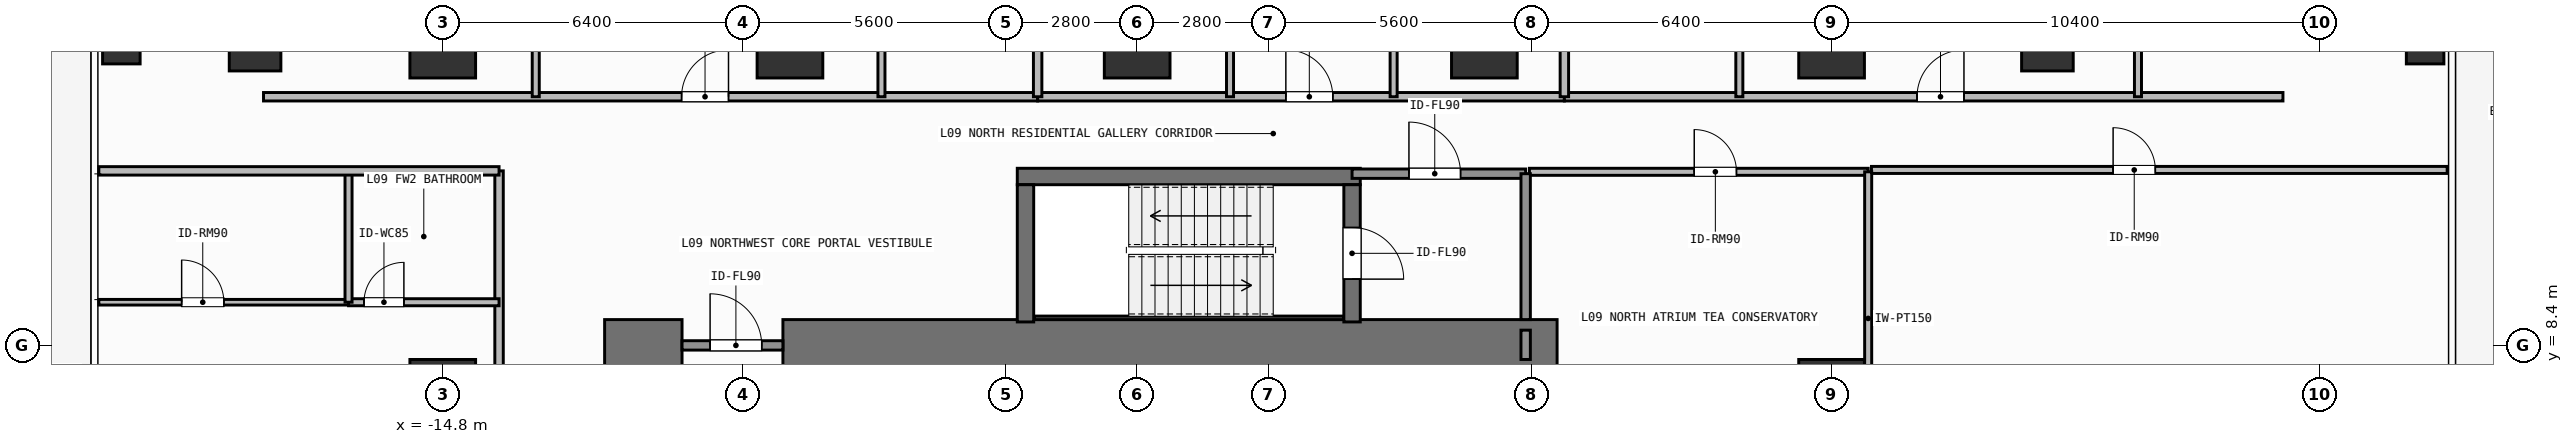
"""IFC4 building model, lengths in metres.
Left out: names, types, materials, properties, quantities, classifications, styles, units other than length and angle.
Written with IfcOpenShell. Run it as: python <this file> out.ifc"""

import sys

from ifc_helpers import new_model, si_unit, direction, frame, frame_2d, origin, origin_2d, place, context, subcontext, project, spatial, rectangle, hollow_rectangle, extrude, element, fill, save


model = new_model("IFC4")
c1 = context("Model", 3, precision=1e-05, world=origin(), true_north=direction((0.0, 1.0)))
c2 = subcontext(c1, "Body", "Model", "MODEL_VIEW")
j1 = project(units=[si_unit("LENGTHUNIT", "METRE"), si_unit("PLANEANGLEUNIT", "RADIAN")], contexts=[c1])
p1 = place(None, origin())
s1 = spatial("IfcSite", under=j1, at=p1, CompositionType="ELEMENT")
p2 = place(p1, origin())
s2 = spatial("IfcBuilding", under=s1, at=p2, CompositionType="ELEMENT")
p3 = place(p2, frame((0.0, 0.0, 34.5)))
s3 = spatial("IfcBuildingStorey", under=s2, at=p3, CompositionType="ELEMENT", Elevation=34.5)
p4 = place(p3, frame((-11.35, 8.4, 0.0), z_axis=(0.0, 0.0, 1.0), x_axis=(1.0, 0.0, 0.0)))
e1 = element("IfcWall", 1, at=p4, inside=s3, PredefinedType="SHEAR", context=c2, shape_type="SweptSolid", body=[
    extrude(rectangle(XDim=1.65, YDim=1.1, at=frame_2d((0.825, 0.0))), origin(), (0.0, 0.0, 1.0), 3.9),
])
p5 = place(p3, frame((-7.55, 8.4, 0.0), z_axis=(0.0, 0.0, 1.0), x_axis=(1.0, 0.0, 0.0)))
e2 = element("IfcWall", 2, at=p5, inside=s3, PredefinedType="SHEAR", context=c2, shape_type="SweptSolid", body=[
    extrude(rectangle(XDim=16.5, YDim=1.1, at=frame_2d((8.25, 0.0))), origin(), (0.0, 0.0, 1.0), 3.9),
])
p6 = place(p3, frame((-2.555, 12.0, 0.0), z_axis=(0.0, 0.0, 1.0), x_axis=(1.0, 0.0, 0.0)))
e3 = element("IfcWall", 3, at=p6, inside=s3, PredefinedType="SHEAR", context=c2, shape_type="SweptSolid", body=[
    extrude(rectangle(XDim=7.31, YDim=0.35, at=frame_2d((3.655, 0.0))), origin(), (0.0, 0.0, 1.0), 3.9),
])
p7 = place(p3, frame((-2.2, 8.988, 0.0), z_axis=(0.0, 0.0, 1.0), x_axis=(1.0, 0.0, 0.0)))
e4 = element("IfcWall", 4, at=p7, inside=s3, PredefinedType="SHEAR", context=c2, shape_type="SweptSolid", body=[
    extrude(rectangle(XDim=6.6, YDim=0.075, at=frame_2d((3.3, 0.0))), origin(), (0.0, 0.0, 1.0), 3.9),
])
p8 = place(p3, frame((-2.38, 8.9, 0.0), z_axis=(0.0, 0.0, 1.0), x_axis=(0.0, 1.0, 0.0)))
e5 = element("IfcWall", 5, at=p8, inside=s3, PredefinedType="SHEAR", context=c2, shape_type="SweptSolid", body=[
    extrude(rectangle(XDim=2.925, YDim=0.35, at=frame_2d((1.462, 0.0))), origin(), (0.0, 0.0, 1.0), 3.9),
])
p9 = place(p3, frame((4.58, 11.825, 0.0), z_axis=(0.0, 0.0, 1.0), x_axis=(0.0, -1.0, 0.0)))
e6 = element("IfcWall", 6, at=p9, inside=s3, PredefinedType="SHEAR", context=c2, shape_type="SweptSolid", body=[
    extrude(rectangle(XDim=2.925, YDim=0.35, at=frame_2d((1.462, 0.0))), origin(), (0.0, 0.0, 1.0), 3.9),
])
p10 = place(p9, frame((0.913, 0.0, 0.0)))
e7 = element("IfcOpeningElement", 7, at=p10, cuts=e6, PredefinedType="OPENING", context=c2, shape_type="SweptSolid", body=[
    extrude(rectangle(XDim=1.1, YDim=2.15, at=frame_2d((0.55, 1.075))), frame((0.0, 0.185, 0.0), z_axis=(0.0, -1.0, 0.0), x_axis=(1.0, 0.0, 0.0)), (0.0, 0.0, 1.0), 0.37),
])
for number, where, z_axis, x_axis in (
    (8, (-14.8, 14.8, 0.0), (0.0, 0.0, 1.0), (1.0, 0.0, 0.0)),
    (9, (-7.4, 14.8, 0.0), (0.0, 0.0, 1.0), (1.0, 0.0, 0.0)),
    (10, (0.0, 14.8, 0.0), (0.0, 0.0, 1.0), (1.0, 0.0, 0.0)),
    (11, (7.4, 14.8, 0.0), (0.0, 0.0, 1.0), (1.0, 0.0, 0.0)),
    (12, (14.8, 14.8, 0.0), (0.0, 0.0, 1.0), (1.0, 0.0, 0.0)),
    (13, (-14.8, 7.4, 0.0), (0.0, 0.0, 1.0), (1.0, 0.0, 0.0)),
    (14, (14.8, 7.4, 0.0), (0.0, 0.0, 1.0), (1.0, 0.0, 0.0)),
):
    element("IfcColumn", number, at=place(p3, frame(where, z_axis=z_axis, x_axis=x_axis)), inside=s3, PredefinedType="COLUMN", context=c2, shape_type="SweptSolid", body=[
        extrude(rectangle(XDim=1.4, YDim=1.4, at=origin_2d()), origin(), (0.0, 0.0, 1.0), 3.9),
    ])
for number, where, z_axis, x_axis in (
    (15, (-18.8, 14.8, 0.0), (0.0, 0.0, 1.0), (1.0, 0.0, 0.0)),
    (16, (19.4, 14.8, 0.0), (0.0, 0.0, 1.0), (1.0, 0.0, 0.0)),
):
    element("IfcColumn", number, at=place(p3, frame(where, z_axis=z_axis, x_axis=x_axis)), inside=s3, PredefinedType="COLUMN", context=c2, shape_type="SweptSolid", body=[
        extrude(rectangle(XDim=1.1, YDim=1.1, at=origin_2d()), origin(), (0.0, 0.0, 1.0), 3.9),
    ])
for number, where, z_axis, x_axis in (
    (17, (-21.65, 14.8, 0.0), (0.0, 0.0, 1.0), (1.0, 0.0, 0.0)),
    (18, (27.45, 14.8, 0.0), (0.0, 0.0, 1.0), (1.0, 0.0, 0.0)),
):
    element("IfcColumn", number, at=place(p3, frame(where, z_axis=z_axis, x_axis=x_axis)), inside=s3, PredefinedType="COLUMN", context=c2, shape_type="SweptSolid", body=[
        extrude(hollow_rectangle(XDim=0.8, YDim=0.8, WallThickness=0.036, at=origin_2d()), origin(), (0.0, 0.0, 1.0), 3.9),
    ])
p11 = place(p3, frame((4.58, 12.06, 0.0), z_axis=(0.0, 0.0, 1.0), x_axis=(1.0, 0.0, 0.0)))
e19 = element("IfcWall", 19, at=p11, inside=s3, PredefinedType="SOLIDWALL", context=c2, shape_type="SweptSolid", body=[
    extrude(rectangle(XDim=3.7, YDim=0.2, at=frame_2d((1.85, 0.0))), origin(), (0.0, 0.0, 1.0), 3.68),
])
p12 = place(p11, frame((1.212, 0.0, 0.0)))
e20 = element("IfcOpeningElement", 20, at=p12, cuts=e19, PredefinedType="OPENING", context=c2, shape_type="SweptSolid", body=[
    extrude(rectangle(XDim=1.1, YDim=2.15, at=frame_2d((0.55, 1.075))), frame((0.0, 0.11, 0.0), z_axis=(0.0, -1.0, 0.0), x_axis=(1.0, 0.0, 0.0)), (0.0, 0.0, 1.0), 0.22),
])
p13 = place(p3, frame((-9.7, 8.4, 0.0), z_axis=(0.0, 0.0, 1.0), x_axis=(1.0, 0.0, 0.0)))
e21 = element("IfcWall", 21, at=p13, inside=s3, PredefinedType="SOLIDWALL", context=c2, shape_type="SweptSolid", body=[
    extrude(rectangle(XDim=2.15, YDim=0.2, at=frame_2d((1.075, 0.0))), origin(), (0.0, 0.0, 1.0), 2.72),
])
p14 = place(p13, frame((0.598, 0.0, 0.0)))
e22 = element("IfcOpeningElement", 22, at=p14, cuts=e21, PredefinedType="OPENING", context=c2, shape_type="SweptSolid", body=[
    extrude(rectangle(XDim=1.1, YDim=2.15, at=frame_2d((0.55, 1.075))), frame((0.0, 0.11, 0.0), z_axis=(0.0, -1.0, 0.0), x_axis=(1.0, 0.0, 0.0)), (0.0, 0.0, 1.0), 0.22),
])
p15 = place(p3, frame((8.36, 12.1, 0.0), z_axis=(0.0, 0.0, 1.0), x_axis=(1.0, 0.0, 0.0)))
e23 = element("IfcWall", 23, at=p15, inside=s3, PredefinedType="PARTITIONING", context=c2, shape_type="SweptSolid", body=[
    extrude(rectangle(XDim=7.22, YDim=0.15, at=frame_2d((3.61, 0.0))), origin(), (0.0, 0.0, 1.0), 3.68),
])
p16 = place(p15, frame((3.513, 0.0, 0.0)))
e24 = element("IfcOpeningElement", 24, at=p16, cuts=e23, PredefinedType="OPENING", context=c2, shape_type="SweptSolid", body=[
    extrude(rectangle(XDim=0.9, YDim=2.1, at=frame_2d((0.45, 1.05))), frame((0.0, 0.085, 0.0), z_axis=(0.0, -1.0, 0.0), x_axis=(1.0, 0.0, 0.0)), (0.0, 0.0, 1.0), 0.17),
])
p17 = place(p3, frame((-18.62, 13.7, 0.0), z_axis=(0.0, 0.0, 1.0), x_axis=(1.0, 0.0, 0.0)))
e25 = element("IfcWall", 25, at=p17, inside=s3, PredefinedType="PARTITIONING", context=c2, shape_type="SweptSolid", body=[
    extrude(rectangle(XDim=16.499, YDim=0.18, at=frame_2d((8.25, 0.0))), origin(), (0.0, 0.0, 1.0), 3.68),
])
p18 = place(p17, frame((8.91, 0.0, 0.0)))
e26 = element("IfcOpeningElement", 26, at=p18, cuts=e25, PredefinedType="OPENING", context=c2, shape_type="SweptSolid", body=[
    extrude(rectangle(XDim=1.0, YDim=2.2, at=frame_2d((0.5, 1.1))), frame((0.0, 0.1, 0.0), z_axis=(0.0, -1.0, 0.0), x_axis=(1.0, 0.0, 0.0)), (0.0, 0.0, 1.0), 0.2),
])
p19 = place(p3, frame((-12.818, 13.7, 0.0), z_axis=(0.0, 0.0, 1.0), x_axis=(0.0, 1.0, 0.0)))
e27 = element("IfcWall", 27, at=p19, inside=s3, PredefinedType="PARTITIONING", context=c2, shape_type="SweptSolid", body=[
    extrude(rectangle(XDim=7.09, YDim=0.15, at=frame_2d((3.545, 0.0))), origin(), (0.0, 0.0, 1.0), 3.68),
])
p20 = place(p19, frame((3.03, 0.0, 0.0)))
e28 = element("IfcOpeningElement", 28, at=p20, cuts=e27, PredefinedType="OPENING", context=c2, shape_type="SweptSolid", body=[
    extrude(rectangle(XDim=0.85, YDim=2.1, at=frame_2d((0.425, 1.05))), frame((0.0, 0.085, 0.0), z_axis=(0.0, -1.0, 0.0), x_axis=(1.0, 0.0, 0.0)), (0.0, 0.0, 1.0), 0.17),
])
p21 = place(p3, frame((-5.45, 13.7, 0.0), z_axis=(0.0, 0.0, 1.0), x_axis=(0.0, 1.0, 0.0)))
e29 = element("IfcWall", 29, at=p21, inside=s3, PredefinedType="PARTITIONING", context=c2, shape_type="SweptSolid", body=[
    extrude(rectangle(XDim=4.566, YDim=0.15, at=frame_2d((2.283, 0.0))), origin(), (0.0, 0.0, 1.0), 3.68),
])
p22 = place(p21, frame((1.948, 0.0, 0.0)))
e30 = element("IfcOpeningElement", 30, at=p22, cuts=e29, PredefinedType="OPENING", context=c2, shape_type="SweptSolid", body=[
    extrude(rectangle(XDim=0.85, YDim=2.1, at=frame_2d((0.425, 1.05))), frame((0.0, 0.085, 0.0), z_axis=(0.0, -1.0, 0.0), x_axis=(1.0, 0.0, 0.0)), (0.0, 0.0, 1.0), 0.17),
])
p23 = place(p3, frame((-2.121, 13.7, 0.0), z_axis=(0.0, 0.0, 1.0), x_axis=(1.0, 0.0, 0.0)))
e31 = element("IfcWall", 31, at=p23, inside=s3, PredefinedType="PARTITIONING", context=c2, shape_type="SweptSolid", body=[
    extrude(rectangle(XDim=11.226, YDim=0.18, at=frame_2d((5.613, 0.0))), origin(), (0.0, 0.0, 1.0), 3.68),
])
p24 = place(p23, frame((5.29, 0.0, 0.0)))
e32 = element("IfcOpeningElement", 32, at=p24, cuts=e31, PredefinedType="OPENING", context=c2, shape_type="SweptSolid", body=[
    extrude(rectangle(XDim=1.0, YDim=2.2, at=frame_2d((0.5, 1.1))), frame((0.0, 0.1, 0.0), z_axis=(0.0, -1.0, 0.0), x_axis=(1.0, 0.0, 0.0)), (0.0, 0.0, 1.0), 0.2),
])
p25 = place(p3, frame((1.979, 13.7, 0.0), z_axis=(0.0, 0.0, 1.0), x_axis=(0.0, 1.0, 0.0)))
e33 = element("IfcWall", 33, at=p25, inside=s3, PredefinedType="PARTITIONING", context=c2, shape_type="SweptSolid", body=[
    extrude(rectangle(XDim=7.09, YDim=0.15, at=frame_2d((3.545, 0.0))), origin(), (0.0, 0.0, 1.0), 3.68),
])
p26 = place(p25, frame((3.03, 0.0, 0.0)))
e34 = element("IfcOpeningElement", 34, at=p26, cuts=e33, PredefinedType="OPENING", context=c2, shape_type="SweptSolid", body=[
    extrude(rectangle(XDim=0.85, YDim=2.1, at=frame_2d((0.425, 1.05))), frame((0.0, 0.085, 0.0), z_axis=(0.0, -1.0, 0.0), x_axis=(1.0, 0.0, 0.0)), (0.0, 0.0, 1.0), 0.17),
])
p27 = place(p3, frame((5.466, 13.7, 0.0), z_axis=(0.0, 0.0, 1.0), x_axis=(0.0, 1.0, 0.0)))
e35 = element("IfcWall", 35, at=p27, inside=s3, PredefinedType="PARTITIONING", context=c2, shape_type="SweptSolid", body=[
    extrude(rectangle(XDim=7.09, YDim=0.15, at=frame_2d((3.545, 0.0))), origin(), (0.0, 0.0, 1.0), 3.68),
])
p28 = place(p27, frame((3.03, 0.0, 0.0)))
e36 = element("IfcOpeningElement", 36, at=p28, cuts=e35, PredefinedType="OPENING", context=c2, shape_type="SweptSolid", body=[
    extrude(rectangle(XDim=0.85, YDim=2.1, at=frame_2d((0.425, 1.05))), frame((0.0, 0.085, 0.0), z_axis=(0.0, -1.0, 0.0), x_axis=(1.0, 0.0, 0.0)), (0.0, 0.0, 1.0), 0.17),
])
p29 = place(p3, frame((9.105, 13.7, 0.0), z_axis=(0.0, 0.0, 1.0), x_axis=(1.0, 0.0, 0.0)))
e37 = element("IfcWall", 37, at=p29, inside=s3, PredefinedType="PARTITIONING", context=c2, shape_type="SweptSolid", body=[
    extrude(rectangle(XDim=15.315, YDim=0.18, at=frame_2d((7.657, 0.0))), origin(), (0.0, 0.0, 1.0), 3.68),
])
p30 = place(p29, frame((7.516, 0.0, 0.0)))
e38 = element("IfcOpeningElement", 38, at=p30, cuts=e37, PredefinedType="OPENING", context=c2, shape_type="SweptSolid", body=[
    extrude(rectangle(XDim=1.0, YDim=2.2, at=frame_2d((0.5, 1.1))), frame((0.0, 0.1, 0.0), z_axis=(0.0, -1.0, 0.0), x_axis=(1.0, 0.0, 0.0)), (0.0, 0.0, 1.0), 0.2),
])
p31 = place(p3, frame((12.834, 13.7, 0.0), z_axis=(0.0, 0.0, 1.0), x_axis=(0.0, 1.0, 0.0)))
e39 = element("IfcWall", 39, at=p31, inside=s3, PredefinedType="PARTITIONING", context=c2, shape_type="SweptSolid", body=[
    extrude(rectangle(XDim=7.09, YDim=0.15, at=frame_2d((3.545, 0.0))), origin(), (0.0, 0.0, 1.0), 3.68),
])
p32 = place(p31, frame((3.03, 0.0, 0.0)))
e40 = element("IfcOpeningElement", 40, at=p32, cuts=e39, PredefinedType="OPENING", context=c2, shape_type="SweptSolid", body=[
    extrude(rectangle(XDim=0.85, YDim=2.1, at=frame_2d((0.425, 1.05))), frame((0.0, 0.085, 0.0), z_axis=(0.0, -1.0, 0.0), x_axis=(1.0, 0.0, 0.0)), (0.0, 0.0, 1.0), 0.17),
])
p33 = place(p3, frame((21.33, 13.7, 0.0), z_axis=(0.0, 0.0, 1.0), x_axis=(0.0, 1.0, 0.0)))
e41 = element("IfcWall", 41, at=p33, inside=s3, PredefinedType="PARTITIONING", context=c2, shape_type="SweptSolid", body=[
    extrude(rectangle(XDim=4.148, YDim=0.15, at=frame_2d((2.074, 0.0))), origin(), (0.0, 0.0, 1.0), 3.68),
])
p34 = place(p33, frame((1.737, 0.0, 0.0)))
e42 = element("IfcOpeningElement", 42, at=p34, cuts=e41, PredefinedType="OPENING", context=c2, shape_type="SweptSolid", body=[
    extrude(rectangle(XDim=0.85, YDim=2.1, at=frame_2d((0.425, 1.05))), frame((0.0, 0.085, 0.0), z_axis=(0.0, -1.0, 0.0), x_axis=(1.0, 0.0, 0.0)), (0.0, 0.0, 1.0), 0.17),
])
p35 = place(p3, frame((-13.6, 0.727, 0.0), z_axis=(0.0, 0.0, 1.0), x_axis=(0.0, 1.0, 0.0)))
e43 = element("IfcWall", 43, at=p35, inside=s3, PredefinedType="PARTITIONING", context=c2, shape_type="SweptSolid", body=[
    extrude(rectangle(XDim=11.393, YDim=0.18, at=frame_2d((5.697, 0.0))), origin(), (0.0, 0.0, 1.0), 3.68),
])
p36 = place(p35, frame((4.837, 0.0, 0.0)))
e44 = element("IfcOpeningElement", 44, at=p36, cuts=e43, PredefinedType="OPENING", context=c2, shape_type="SweptSolid", body=[
    extrude(rectangle(XDim=1.0, YDim=2.2, at=frame_2d((0.5, 1.1))), frame((0.0, 0.1, 0.0), z_axis=(0.0, -1.0, 0.0), x_axis=(1.0, 0.0, 0.0)), (0.0, 0.0, 1.0), 0.2),
])
p37 = place(p3, frame((-16.808, 9.32, 0.0), z_axis=(0.0, 0.0, 1.0), x_axis=(1.0, 0.0, 0.0)))
e45 = element("IfcWall", 45, at=p37, inside=s3, PredefinedType="PARTITIONING", context=c2, shape_type="SweptSolid", body=[
    extrude(rectangle(XDim=3.208, YDim=0.15, at=frame_2d((1.604, 0.0))), origin(), (0.0, 0.0, 1.0), 3.68),
])
p38 = place(p37, frame((0.33, 0.0, 0.0)))
e46 = element("IfcOpeningElement", 46, at=p38, cuts=e45, PredefinedType="OPENING", context=c2, shape_type="SweptSolid", body=[
    extrude(rectangle(XDim=0.85, YDim=2.1, at=frame_2d((0.425, 1.05))), frame((0.0, 0.085, 0.0), z_axis=(0.0, -1.0, 0.0), x_axis=(1.0, 0.0, 0.0)), (0.0, 0.0, 1.0), 0.17),
])
p39 = place(p3, frame((-22.13, 9.32, 0.0), z_axis=(0.0, 0.0, 1.0), x_axis=(1.0, 0.0, 0.0)))
e47 = element("IfcWall", 47, at=p39, inside=s3, PredefinedType="PARTITIONING", context=c2, shape_type="SweptSolid", body=[
    extrude(rectangle(XDim=5.322, YDim=0.12, at=frame_2d((2.661, 0.0))), origin(), (0.0, 0.0, 1.0), 3.68),
])
p40 = place(p39, frame((1.765, 0.0, 0.0)))
e48 = element("IfcOpeningElement", 48, at=p40, cuts=e47, PredefinedType="OPENING", context=c2, shape_type="SweptSolid", body=[
    extrude(rectangle(XDim=0.9, YDim=2.1, at=frame_2d((0.45, 1.05))), frame((0.0, 0.07, 0.0), z_axis=(0.0, -1.0, 0.0), x_axis=(1.0, 0.0, 0.0)), (0.0, 0.0, 1.0), 0.14),
])
p41 = place(p3, frame((15.65, 12.14, 0.0), z_axis=(0.0, 0.0, 1.0), x_axis=(1.0, 0.0, 0.0)))
e49 = element("IfcWall", 49, at=p41, inside=s3, PredefinedType="PARTITIONING", context=c2, shape_type="SweptSolid", body=[
    extrude(rectangle(XDim=12.27, YDim=0.15, at=frame_2d((6.135, 0.0))), origin(), (0.0, 0.0, 1.0), 3.68),
])
p42 = place(p41, frame((5.15, 0.0, 0.0)))
e50 = element("IfcOpeningElement", 50, at=p42, cuts=e49, PredefinedType="OPENING", context=c2, shape_type="SweptSolid", body=[
    extrude(rectangle(XDim=0.9, YDim=2.1, at=frame_2d((0.45, 1.05))), frame((0.0, 0.085, 0.0), z_axis=(0.0, -1.0, 0.0), x_axis=(1.0, 0.0, 0.0)), (0.0, 0.0, 1.0), 0.17),
])
p43 = place(p3, frame((8.28, 8.95, 0.0), z_axis=(0.0, 0.0, 1.0), x_axis=(0.0, 1.0, 0.0)))
e51 = element("IfcWall", 51, at=p43, inside=s3, PredefinedType="SOLIDWALL", context=c2, shape_type="SweptSolid", body=[
    extrude(rectangle(XDim=3.11, YDim=0.2, at=frame_2d((1.555, 0.0))), origin(), (0.0, 0.0, 1.0), 3.68),
])
p44 = place(p3, frame((8.28, 8.1, 0.0), z_axis=(0.0, 0.0, 1.0), x_axis=(0.0, 1.0, 0.0)))
e52 = element("IfcWall", 52, at=p44, inside=s3, PredefinedType="SOLIDWALL", context=c2, shape_type="SweptSolid", body=[
    extrude(rectangle(XDim=0.625, YDim=0.2, at=frame_2d((0.312, 0.0))), origin(), (0.0, 0.0, 1.0), 3.68),
])
p45 = place(p3, frame((15.58, 5.85, 0.0), z_axis=(0.0, 0.0, 1.0), x_axis=(0.0, 1.0, 0.0)))
e53 = element("IfcWall", 53, at=p45, inside=s3, PredefinedType="PARTITIONING", context=c2, shape_type="SweptSolid", body=[
    extrude(rectangle(XDim=6.25, YDim=0.15, at=frame_2d((3.125, 0.0))), origin(), (0.0, 0.0, 1.0), 3.68),
])
for number, where, z_axis, x_axis in (
    (54, (-2.121, 13.7, 0.0), (0.0, 0.0, 1.0), (0.0, 1.0, 0.0)),
    (55, (9.105, 13.7, 0.0), (0.0, 0.0, 1.0), (0.0, 1.0, 0.0)),
):
    element("IfcWall", number, at=place(p3, frame(where, z_axis=z_axis, x_axis=x_axis)), inside=s3, PredefinedType="PARTITIONING", context=c2, shape_type="SweptSolid", body=[
        extrude(rectangle(XDim=11.33, YDim=0.18, at=frame_2d((5.665, 0.0))), origin(), (0.0, 0.0, 1.0), 3.68),
    ])
p46 = place(p3, frame((-16.808, 9.32, 0.0), z_axis=(0.0, 0.0, 1.0), x_axis=(0.0, 1.0, 0.0)))
e56 = element("IfcWall", 56, at=p46, inside=s3, PredefinedType="PARTITIONING", context=c2, shape_type="SweptSolid", body=[
    extrude(rectangle(XDim=2.8, YDim=0.15, at=frame_2d((1.4, 0.0))), origin(), (0.0, 0.0, 1.0), 3.68),
])
p47 = place(p3, frame((-22.13, 12.12, 0.0), z_axis=(0.0, 0.0, 1.0), x_axis=(1.0, 0.0, 0.0)))
e57 = element("IfcWall", 57, at=p47, inside=s3, PredefinedType="PARTITIONING", context=c2, shape_type="SweptSolid", body=[
    extrude(rectangle(XDim=8.53, YDim=0.18, at=frame_2d((4.265, 0.0))), origin(), (0.0, 0.0, 1.0), 3.68),
])
p48 = place(p10, origin())
e58 = element("IfcDoor", 58, at=p48, inside=s3, OperationType="SINGLE_SWING_RIGHT", PredefinedType="DOOR", context=c2, shape_type="SweptSolid", body=[
    extrude(rectangle(XDim=1.1, YDim=2.15, at=frame_2d((0.55, 1.075))), frame((0.0, 0.025, 0.0), z_axis=(0.0, -1.0, 0.0), x_axis=(1.0, 0.0, 0.0)), (0.0, 0.0, 1.0), 0.05),
])
fill(e7, e58)
p49 = place(p12, origin())
e59 = element("IfcDoor", 59, at=p49, inside=s3, OperationType="SINGLE_SWING_LEFT", PredefinedType="DOOR", context=c2, shape_type="SweptSolid", body=[
    extrude(rectangle(XDim=1.1, YDim=2.15, at=frame_2d((0.55, 1.075))), frame((0.0, 0.025, 0.0), z_axis=(0.0, -1.0, 0.0), x_axis=(1.0, 0.0, 0.0)), (0.0, 0.0, 1.0), 0.05),
])
fill(e20, e59)
p50 = place(p14, origin())
e60 = element("IfcDoor", 60, at=p50, inside=s3, OperationType="SINGLE_SWING_LEFT", PredefinedType="DOOR", context=c2, shape_type="SweptSolid", body=[
    extrude(rectangle(XDim=1.1, YDim=2.15, at=frame_2d((0.55, 1.075))), frame((0.0, 0.025, 0.0), z_axis=(0.0, -1.0, 0.0), x_axis=(1.0, 0.0, 0.0)), (0.0, 0.0, 1.0), 0.05),
])
fill(e22, e60)
p51 = place(p16, origin())
e61 = element("IfcDoor", 61, at=p51, inside=s3, OperationType="SINGLE_SWING_LEFT", PredefinedType="DOOR", context=c2, shape_type="SweptSolid", body=[
    extrude(rectangle(XDim=0.9, YDim=2.1, at=frame_2d((0.45, 1.05))), frame((0.0, 0.025, 0.0), z_axis=(0.0, -1.0, 0.0), x_axis=(1.0, 0.0, 0.0)), (0.0, 0.0, 1.0), 0.05),
])
fill(e24, e61)
p52 = place(p18, origin())
e62 = element("IfcDoor", 62, at=p52, inside=s3, OperationType="SINGLE_SWING_RIGHT", PredefinedType="DOOR", context=c2, shape_type="SweptSolid", body=[
    extrude(rectangle(XDim=1.0, YDim=2.2, at=frame_2d((0.5, 1.1))), frame((0.0, 0.025, 0.0), z_axis=(0.0, -1.0, 0.0), x_axis=(1.0, 0.0, 0.0)), (0.0, 0.0, 1.0), 0.05),
])
fill(e26, e62)
p53 = place(p24, origin())
e63 = element("IfcDoor", 63, at=p53, inside=s3, OperationType="SINGLE_SWING_LEFT", PredefinedType="DOOR", context=c2, shape_type="SweptSolid", body=[
    extrude(rectangle(XDim=1.0, YDim=2.2, at=frame_2d((0.5, 1.1))), frame((0.0, 0.025, 0.0), z_axis=(0.0, -1.0, 0.0), x_axis=(1.0, 0.0, 0.0)), (0.0, 0.0, 1.0), 0.05),
])
fill(e32, e63)
p54 = place(p30, origin())
e64 = element("IfcDoor", 64, at=p54, inside=s3, OperationType="SINGLE_SWING_RIGHT", PredefinedType="DOOR", context=c2, shape_type="SweptSolid", body=[
    extrude(rectangle(XDim=1.0, YDim=2.2, at=frame_2d((0.5, 1.1))), frame((0.0, 0.025, 0.0), z_axis=(0.0, -1.0, 0.0), x_axis=(1.0, 0.0, 0.0)), (0.0, 0.0, 1.0), 0.05),
])
fill(e38, e64)
p55 = place(p38, origin())
e65 = element("IfcDoor", 65, at=p55, inside=s3, OperationType="SINGLE_SWING_RIGHT", PredefinedType="DOOR", context=c2, shape_type="SweptSolid", body=[
    extrude(rectangle(XDim=0.85, YDim=2.1, at=frame_2d((0.425, 1.05))), frame((0.0, 0.025, 0.0), z_axis=(0.0, -1.0, 0.0), x_axis=(1.0, 0.0, 0.0)), (0.0, 0.0, 1.0), 0.05),
])
fill(e46, e65)
p56 = place(p40, origin())
e66 = element("IfcDoor", 66, at=p56, inside=s3, OperationType="SINGLE_SWING_LEFT", PredefinedType="DOOR", context=c2, shape_type="SweptSolid", body=[
    extrude(rectangle(XDim=0.9, YDim=2.1, at=frame_2d((0.45, 1.05))), frame((0.0, 0.025, 0.0), z_axis=(0.0, -1.0, 0.0), x_axis=(1.0, 0.0, 0.0)), (0.0, 0.0, 1.0), 0.05),
])
fill(e48, e66)
p57 = place(p42, origin())
e67 = element("IfcDoor", 67, at=p57, inside=s3, OperationType="SINGLE_SWING_LEFT", PredefinedType="DOOR", context=c2, shape_type="SweptSolid", body=[
    extrude(rectangle(XDim=0.9, YDim=2.1, at=frame_2d((0.45, 1.05))), frame((0.0, 0.025, 0.0), z_axis=(0.0, -1.0, 0.0), x_axis=(1.0, 0.0, 0.0)), (0.0, 0.0, 1.0), 0.05),
])
fill(e50, e67)
save(model, sys.argv[1])
